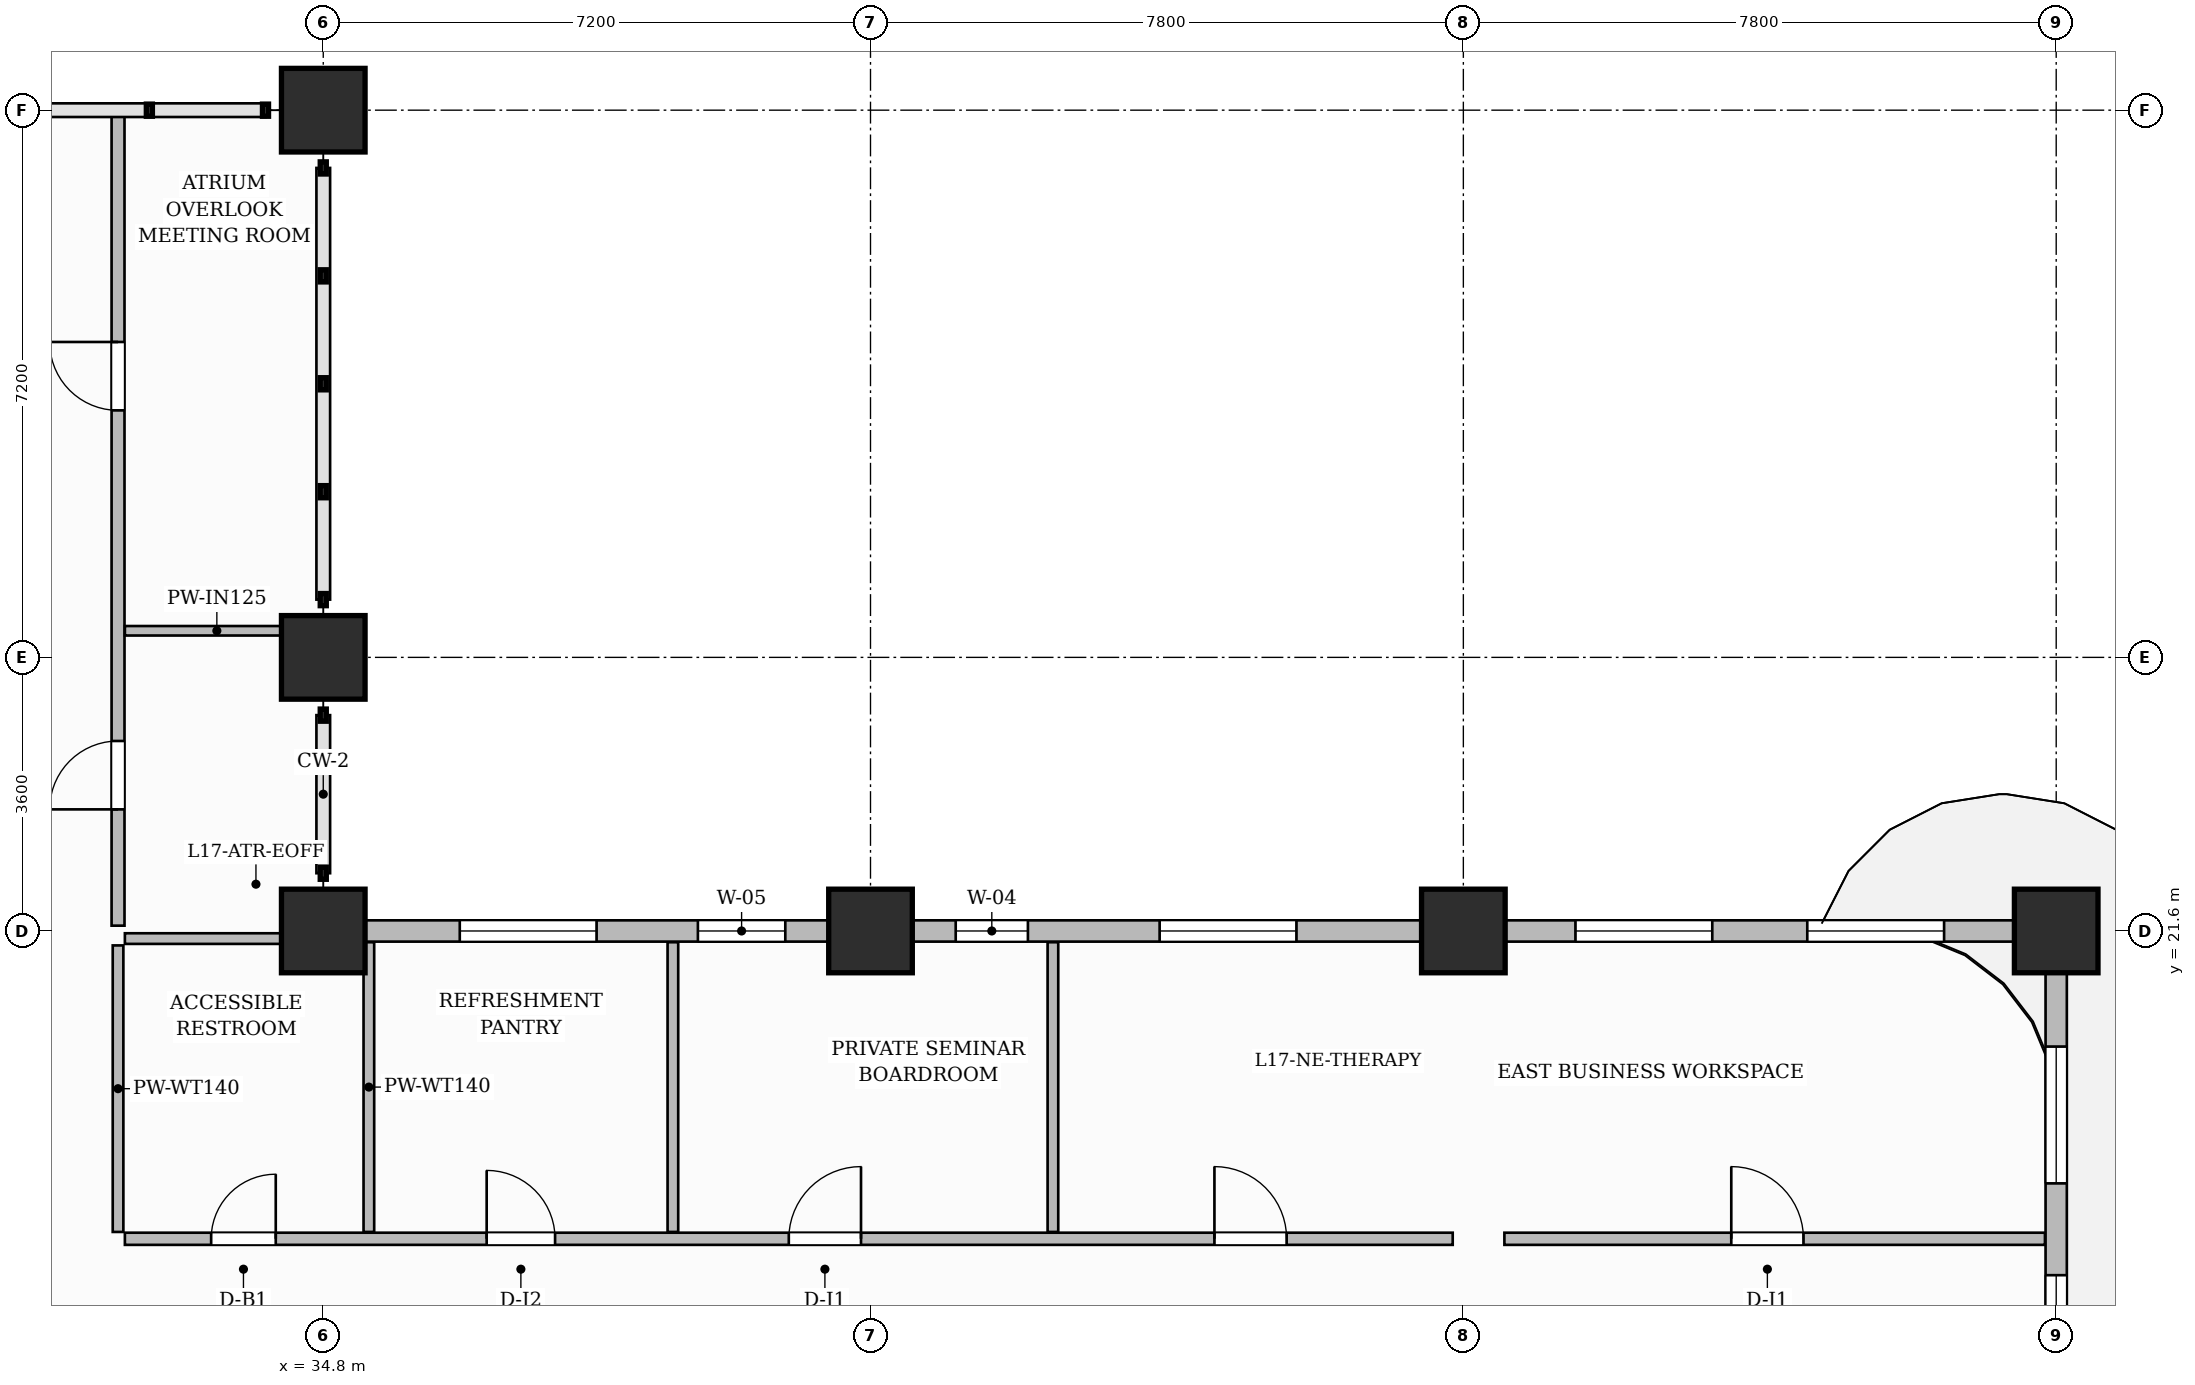
"""IFC4 building model, lengths in metres.
Left out: names, types, materials, properties, quantities, classifications, styles, units other than length and angle.
Written with IfcOpenShell. Run it as: python <this file> out.ifc"""

import sys

from ifc_helpers import new_model, si_unit, direction, frame, frame_2d, origin, origin_2d, place, context, subcontext, project, spatial, rectangle, extrude, source, transform, mapped, element, fill, save


model = new_model("IFC4")
c1 = context("Model", 3, precision=1e-05, world=origin(), true_north=direction((0.0, 1.0)))
c2 = subcontext(c1, "Body", "Model", "MODEL_VIEW")
j1 = project(units=[si_unit("LENGTHUNIT", "METRE"), si_unit("PLANEANGLEUNIT", "RADIAN")], contexts=[c1])
p1 = place(None, origin())
s1 = spatial("IfcSite", under=j1, at=p1, CompositionType="ELEMENT")
p2 = place(p1, origin())
s2 = spatial("IfcBuilding", under=s1, at=p2, CompositionType="ELEMENT")
p3 = place(p2, frame((0.0, 0.0, 73.1)))
s3 = spatial("IfcBuildingStorey", under=s2, at=p3, CompositionType="ELEMENT", Elevation=73.1)
m1 = source(origin(), c2, "Body", "SweptSolid", [
    extrude(rectangle(XDim=1.1, YDim=1.1, at=origin_2d()), origin(), (0.0, 0.0, 1.0), 3.7),
])
for number, where, z_axis, x_axis in (
    (1, (34.8, 21.6, 0.0), (0.0, 0.0, 1.0), (1.0, 0.0, 0.0)),
    (2, (34.8, 25.2, 0.0), (0.0, 0.0, 1.0), (1.0, 0.0, 0.0)),
    (3, (34.8, 32.4, 0.0), (0.0, 0.0, 1.0), (1.0, 0.0, 0.0)),
    (4, (42.0, 21.6, 0.0), (0.0, 0.0, 1.0), (1.0, 0.0, 0.0)),
    (5, (49.8, 21.6, 0.0), (0.0, 0.0, 1.0), (1.0, 0.0, 0.0)),
    (6, (57.6, 21.6, 0.0), (0.0, 0.0, 1.0), (1.0, 0.0, 0.0)),
):
    element("IfcColumn", number, at=place(p3, frame(where, z_axis=z_axis, x_axis=x_axis)), inside=s3, PredefinedType="COLUMN", context=c2, shape_type="MappedRepresentation", body=[
        mapped(m1, transform((0.0, 0.0, 0.0), scale=1.0)),
    ])
p4 = place(p3, frame((32.19, 17.55, 0.0), z_axis=(0.0, 0.0, 1.0), x_axis=(1.0, 0.0, 0.0)))
e7 = element("IfcWall", 7, at=p4, inside=s3, PredefinedType="PARTITIONING", context=c2, shape_type="SweptSolid", body=[
    extrude(rectangle(XDim=17.47, YDim=0.16, at=frame_2d((8.735, 0.0))), origin(), (0.0, 0.0, 1.0), 3.45),
])
p5 = place(p4, frame((1.135, 0.0, 0.0)))
e8 = element("IfcOpeningElement", 8, at=p5, cuts=e7, PredefinedType="OPENING", context=c2, shape_type="SweptSolid", body=[
    extrude(rectangle(XDim=0.85, YDim=2.1, at=frame_2d((0.425, 1.05))), frame((0.0, 0.09, 0.0), z_axis=(0.0, -1.0, 0.0), x_axis=(1.0, 0.0, 0.0)), (0.0, 0.0, 1.0), 0.18),
])
p6 = place(p4, frame((4.76, 0.0, 0.0)))
e9 = element("IfcOpeningElement", 9, at=p6, cuts=e7, PredefinedType="OPENING", context=c2, shape_type="SweptSolid", body=[
    extrude(rectangle(XDim=0.9, YDim=2.15, at=frame_2d((0.45, 1.075))), frame((0.0, 0.09, 0.0), z_axis=(0.0, -1.0, 0.0), x_axis=(1.0, 0.0, 0.0)), (0.0, 0.0, 1.0), 0.18),
])
p7 = place(p4, frame((8.735, 0.0, 0.0)))
e10 = element("IfcOpeningElement", 10, at=p7, cuts=e7, PredefinedType="OPENING", context=c2, shape_type="SweptSolid", body=[
    extrude(rectangle(XDim=0.95, YDim=2.15, at=frame_2d((0.475, 1.075))), frame((0.0, 0.09, 0.0), z_axis=(0.0, -1.0, 0.0), x_axis=(1.0, 0.0, 0.0)), (0.0, 0.0, 1.0), 0.18),
])
p8 = place(p4, frame((14.335, 0.0, 0.0)))
e11 = element("IfcOpeningElement", 11, at=p8, cuts=e7, PredefinedType="OPENING", context=c2, shape_type="SweptSolid", body=[
    extrude(rectangle(XDim=0.95, YDim=2.15, at=frame_2d((0.475, 1.075))), frame((0.0, 0.09, 0.0), z_axis=(0.0, -1.0, 0.0), x_axis=(1.0, 0.0, 0.0)), (0.0, 0.0, 1.0), 0.18),
])
p9 = place(p3, frame((50.34, 17.55, 0.0), z_axis=(0.0, 0.0, 1.0), x_axis=(1.0, 0.0, 0.0)))
e12 = element("IfcWall", 12, at=p9, inside=s3, PredefinedType="PARTITIONING", context=c2, shape_type="SweptSolid", body=[
    extrude(rectangle(XDim=7.112, YDim=0.16, at=frame_2d((3.556, 0.0))), origin(), (0.0, 0.0, 1.0), 3.45),
])
p10 = place(p9, frame((2.985, 0.0, 0.0)))
e13 = element("IfcOpeningElement", 13, at=p10, cuts=e12, PredefinedType="OPENING", context=c2, shape_type="SweptSolid", body=[
    extrude(rectangle(XDim=0.95, YDim=2.15, at=frame_2d((0.475, 1.075))), frame((0.0, 0.09, 0.0), z_axis=(0.0, -1.0, 0.0), x_axis=(1.0, 0.0, 0.0)), (0.0, 0.0, 1.0), 0.18),
])
p11 = place(p3, frame((32.1, 17.64, 0.0), z_axis=(0.0, 0.0, 1.0), x_axis=(0.0, 1.0, 0.0)))
e14 = element("IfcWall", 14, at=p11, inside=s3, PredefinedType="PARTITIONING", context=c2, shape_type="SweptSolid", body=[
    extrude(rectangle(XDim=3.77, YDim=0.14, at=frame_2d((1.885, 0.0))), origin(), (0.0, 0.0, 1.0), 3.45),
])
for number, where, z_axis, x_axis in (
    (15, (35.4, 17.64, 0.0), (0.0, 0.0, 1.0), (0.0, 1.0, 0.0)),
    (16, (39.4, 17.64, 0.0), (0.0, 0.0, 1.0), (0.0, 1.0, 0.0)),
    (17, (44.4, 17.64, 0.0), (0.0, 0.0, 1.0), (0.0, 1.0, 0.0)),
):
    element("IfcWall", number, at=place(p3, frame(where, z_axis=z_axis, x_axis=x_axis)), inside=s3, PredefinedType="PARTITIONING", context=c2, shape_type="SweptSolid", body=[
        extrude(rectangle(XDim=3.812, YDim=0.14, at=frame_2d((1.906, 0.0))), origin(), (0.0, 0.0, 1.0), 3.45),
    ])
p12 = place(p3, frame((32.19, 21.5, 0.0), z_axis=(0.0, 0.0, 1.0), x_axis=(1.0, 0.0, 0.0)))
e18 = element("IfcWall", 18, at=p12, inside=s3, PredefinedType="PARTITIONING", context=c2, shape_type="SweptSolid", body=[
    extrude(rectangle(XDim=2.42, YDim=0.14, at=frame_2d((1.21, 0.0))), origin(), (0.0, 0.0, 1.0), 2.885),
])
p13 = place(p3, frame((32.1, 21.67, 0.0), z_axis=(0.0, 0.0, 1.0), x_axis=(0.0, 1.0, 0.0)))
e19 = element("IfcWall", 19, at=p13, inside=s3, PredefinedType="PARTITIONING", context=c2, shape_type="SweptSolid", body=[
    extrude(rectangle(XDim=10.702, YDim=0.17, at=frame_2d((5.351, 0.0))), origin(), (0.0, 0.0, 1.0), 3.45),
])
p14 = place(p13, frame((1.53, 0.0, 0.0)))
e20 = element("IfcOpeningElement", 20, at=p14, cuts=e19, PredefinedType="OPENING", context=c2, shape_type="SweptSolid", body=[
    extrude(rectangle(XDim=0.9, YDim=2.15, at=frame_2d((0.45, 1.075))), frame((0.0, 0.095, 0.0), z_axis=(0.0, -1.0, 0.0), x_axis=(1.0, 0.0, 0.0)), (0.0, 0.0, 1.0), 0.19),
])
p15 = place(p13, frame((6.78, 0.0, 0.0)))
e21 = element("IfcOpeningElement", 21, at=p15, cuts=e19, PredefinedType="OPENING", context=c2, shape_type="SweptSolid", body=[
    extrude(rectangle(XDim=0.9, YDim=2.15, at=frame_2d((0.45, 1.075))), frame((0.0, 0.095, 0.0), z_axis=(0.0, -1.0, 0.0), x_axis=(1.0, 0.0, 0.0)), (0.0, 0.0, 1.0), 0.19),
])
p16 = place(p3, frame((32.19, 25.55, 0.0), z_axis=(0.0, 0.0, 1.0), x_axis=(1.0, 0.0, 0.0)))
e22 = element("IfcWall", 22, at=p16, inside=s3, PredefinedType="PARTITIONING", context=c2, shape_type="SweptSolid", body=[
    extrude(rectangle(XDim=2.42, YDim=0.125, at=frame_2d((1.21, 0.0))), origin(), (0.0, 0.0, 1.0), 3.45),
])
p17 = place(p3, frame((57.6, 0.05, 0.0), z_axis=(0.0, 0.0, 1.0), x_axis=(0.0, 1.0, 0.0)))
e23 = element("IfcWall", 23, at=p17, inside=s3, PredefinedType="SOLIDWALL", context=c2, shape_type="SweptSolid", body=[
    extrude(rectangle(XDim=21.5, YDim=0.28, at=frame_2d((10.75, 0.0))), origin(), (0.0, 0.0, 1.0), 2.885),
])
p18 = place(p17, frame((2.75, 0.0, 0.0)))
e24 = element("IfcOpeningElement", 24, at=p18, cuts=e23, PredefinedType="OPENING", context=c2, shape_type="SweptSolid", body=[
    extrude(rectangle(XDim=1.2, YDim=2.2, at=frame_2d((0.6, 1.1))), frame((0.0, 0.15, 0.0), z_axis=(0.0, -1.0, 0.0), x_axis=(1.0, 0.0, 0.0)), (0.0, 0.0, 1.0), 0.3),
])
p19 = place(p17, frame((1.025, 0.0, 0.8)))
e25 = element("IfcOpeningElement", 25, at=p19, cuts=e23, PredefinedType="OPENING", context=c2, shape_type="SweptSolid", body=[
    extrude(rectangle(XDim=1.15, YDim=1.8, at=frame_2d((0.575, 0.9))), frame((0.0, 0.15, 0.0), z_axis=(0.0, -1.0, 0.0), x_axis=(1.0, 0.0, 0.0)), (0.0, 0.0, 1.0), 0.3),
])
p20 = place(p17, frame((4.654, 0.0, 0.8)))
e26 = element("IfcOpeningElement", 26, at=p20, cuts=e23, PredefinedType="OPENING", context=c2, shape_type="SweptSolid", body=[
    extrude(rectangle(XDim=1.4, YDim=1.85, at=frame_2d((0.7, 0.925))), frame((0.0, 0.15, 0.0), z_axis=(0.0, -1.0, 0.0), x_axis=(1.0, 0.0, 0.0)), (0.0, 0.0, 1.0), 0.3),
])
p21 = place(p17, frame((10.454, 0.0, 0.8)))
e27 = element("IfcOpeningElement", 27, at=p21, cuts=e23, PredefinedType="OPENING", context=c2, shape_type="SweptSolid", body=[
    extrude(rectangle(XDim=1.8, YDim=1.85, at=frame_2d((0.9, 0.925))), frame((0.0, 0.15, 0.0), z_axis=(0.0, -1.0, 0.0), x_axis=(1.0, 0.0, 0.0)), (0.0, 0.0, 1.0), 0.3),
])
p22 = place(p17, frame((15.621, 0.0, 0.8)))
e28 = element("IfcOpeningElement", 28, at=p22, cuts=e23, PredefinedType="OPENING", context=c2, shape_type="SweptSolid", body=[
    extrude(rectangle(XDim=1.4, YDim=1.85, at=frame_2d((0.7, 0.925))), frame((0.0, 0.15, 0.0), z_axis=(0.0, -1.0, 0.0), x_axis=(1.0, 0.0, 0.0)), (0.0, 0.0, 1.0), 0.3),
])
p23 = place(p17, frame((18.229, 0.0, 0.8)))
e29 = element("IfcOpeningElement", 29, at=p23, cuts=e23, PredefinedType="OPENING", context=c2, shape_type="SweptSolid", body=[
    extrude(rectangle(XDim=1.8, YDim=1.85, at=frame_2d((0.9, 0.925))), frame((0.0, 0.15, 0.0), z_axis=(0.0, -1.0, 0.0), x_axis=(1.0, 0.0, 0.0)), (0.0, 0.0, 1.0), 0.3),
])
p24 = place(p3, frame((34.8, 21.6, 0.0), z_axis=(0.0, 0.0, 1.0), x_axis=(1.0, 0.0, 0.0)))
e30 = element("IfcWall", 30, at=p24, inside=s3, PredefinedType="SOLIDWALL", context=c2, shape_type="SweptSolid", body=[
    extrude(rectangle(XDim=22.8, YDim=0.28, at=frame_2d((11.4, 0.0))), origin(), (0.0, 0.0, 1.0), 2.885),
])
p25 = place(p24, frame((1.796, 0.0, 0.8)))
e31 = element("IfcOpeningElement", 31, at=p25, cuts=e30, PredefinedType="OPENING", context=c2, shape_type="SweptSolid", body=[
    extrude(rectangle(XDim=1.8, YDim=1.85, at=frame_2d((0.9, 0.925))), frame((0.0, 0.15, 0.0), z_axis=(0.0, -1.0, 0.0), x_axis=(1.0, 0.0, 0.0)), (0.0, 0.0, 1.0), 0.3),
])
p26 = place(p24, frame((4.929, 0.0, 0.8)))
e32 = element("IfcOpeningElement", 32, at=p26, cuts=e30, PredefinedType="OPENING", context=c2, shape_type="SweptSolid", body=[
    extrude(rectangle(XDim=1.15, YDim=1.8, at=frame_2d((0.575, 0.9))), frame((0.0, 0.15, 0.0), z_axis=(0.0, -1.0, 0.0), x_axis=(1.0, 0.0, 0.0)), (0.0, 0.0, 1.0), 0.3),
])
p27 = place(p24, frame((8.321, 0.0, 0.8)))
e33 = element("IfcOpeningElement", 33, at=p27, cuts=e30, PredefinedType="OPENING", context=c2, shape_type="SweptSolid", body=[
    extrude(rectangle(XDim=0.95, YDim=1.75, at=frame_2d((0.475, 0.875))), frame((0.0, 0.15, 0.0), z_axis=(0.0, -1.0, 0.0), x_axis=(1.0, 0.0, 0.0)), (0.0, 0.0, 1.0), 0.3),
])
p28 = place(p24, frame((11.004, 0.0, 0.8)))
e34 = element("IfcOpeningElement", 34, at=p28, cuts=e30, PredefinedType="OPENING", context=c2, shape_type="SweptSolid", body=[
    extrude(rectangle(XDim=1.8, YDim=1.85, at=frame_2d((0.9, 0.925))), frame((0.0, 0.15, 0.0), z_axis=(0.0, -1.0, 0.0), x_axis=(1.0, 0.0, 0.0)), (0.0, 0.0, 1.0), 0.3),
])
p29 = place(p24, frame((16.475, 0.0, 0.8)))
e35 = element("IfcOpeningElement", 35, at=p29, cuts=e30, PredefinedType="OPENING", context=c2, shape_type="SweptSolid", body=[
    extrude(rectangle(XDim=1.8, YDim=1.85, at=frame_2d((0.9, 0.925))), frame((0.0, 0.15, 0.0), z_axis=(0.0, -1.0, 0.0), x_axis=(1.0, 0.0, 0.0)), (0.0, 0.0, 1.0), 0.3),
])
p30 = place(p24, frame((19.525, 0.0, 0.8)))
e36 = element("IfcOpeningElement", 36, at=p30, cuts=e30, PredefinedType="OPENING", context=c2, shape_type="SweptSolid", body=[
    extrude(rectangle(XDim=1.8, YDim=1.85, at=frame_2d((0.9, 0.925))), frame((0.0, 0.15, 0.0), z_axis=(0.0, -1.0, 0.0), x_axis=(1.0, 0.0, 0.0)), (0.0, 0.0, 1.0), 0.3),
])
m2 = source(origin(), c2, "Body", "SweptSolid", [
    extrude(rectangle(XDim=0.95, YDim=2.15, at=frame_2d((0.475, 1.075))), frame((0.0, 0.025, 0.0), z_axis=(0.0, -1.0, 0.0), x_axis=(1.0, 0.0, 0.0)), (0.0, 0.0, 1.0), 0.05),
])
p31 = place(p10, origin())
e37 = element("IfcDoor", 37, at=p31, inside=s3, OperationType="SINGLE_SWING_LEFT", PredefinedType="DOOR", context=c2, shape_type="MappedRepresentation", body=[
    mapped(m2, transform((0.0, 0.0, 0.0), scale=1.0)),
])
fill(e13, e37)
m3 = source(origin(), c2, "Body", "SweptSolid", [
    extrude(rectangle(XDim=0.85, YDim=2.1, at=frame_2d((0.425, 1.05))), frame((0.0, 0.025, 0.0), z_axis=(0.0, -1.0, 0.0), x_axis=(1.0, 0.0, 0.0)), (0.0, 0.0, 1.0), 0.05),
])
p32 = place(p5, origin())
e38 = element("IfcDoor", 38, at=p32, inside=s3, OperationType="SINGLE_SWING_RIGHT", PredefinedType="DOOR", context=c2, shape_type="MappedRepresentation", body=[
    mapped(m3, transform((0.0, 0.0, 0.0), scale=1.0)),
])
fill(e8, e38)
m4 = source(origin(), c2, "Body", "SweptSolid", [
    extrude(rectangle(XDim=0.9, YDim=2.15, at=frame_2d((0.45, 1.075))), frame((0.0, 0.025, 0.0), z_axis=(0.0, -1.0, 0.0), x_axis=(1.0, 0.0, 0.0)), (0.0, 0.0, 1.0), 0.05),
])
p33 = place(p6, origin())
e39 = element("IfcDoor", 39, at=p33, inside=s3, OperationType="SINGLE_SWING_LEFT", PredefinedType="DOOR", context=c2, shape_type="MappedRepresentation", body=[
    mapped(m4, transform((0.0, 0.0, 0.0), scale=1.0)),
])
fill(e9, e39)
p34 = place(p7, origin())
e40 = element("IfcDoor", 40, at=p34, inside=s3, OperationType="SINGLE_SWING_RIGHT", PredefinedType="DOOR", context=c2, shape_type="MappedRepresentation", body=[
    mapped(m2, transform((0.0, 0.0, 0.0), scale=1.0)),
])
fill(e10, e40)
p35 = place(p8, origin())
e41 = element("IfcDoor", 41, at=p35, inside=s3, OperationType="SINGLE_SWING_LEFT", PredefinedType="DOOR", context=c2, shape_type="MappedRepresentation", body=[
    mapped(m2, transform((0.0, 0.0, 0.0), scale=1.0)),
])
fill(e11, e41)
p36 = place(p14, origin())
e42 = element("IfcDoor", 42, at=p36, inside=s3, OperationType="SINGLE_SWING_LEFT", PredefinedType="DOOR", context=c2, shape_type="MappedRepresentation", body=[
    mapped(m4, transform((0.0, 0.0, 0.0), scale=1.0)),
])
fill(e20, e42)
p37 = place(p15, origin())
e43 = element("IfcDoor", 43, at=p37, inside=s3, OperationType="SINGLE_SWING_RIGHT", PredefinedType="DOOR", context=c2, shape_type="MappedRepresentation", body=[
    mapped(m4, transform((0.0, 0.0, 0.0), scale=1.0)),
])
fill(e21, e43)
m5 = source(origin(), c2, "Body", "SweptSolid", [
    extrude(rectangle(XDim=1.4, YDim=1.85, at=frame_2d((0.7, 0.925))), frame((0.0, 0.03, 0.0), z_axis=(0.0, -1.0, 0.0), x_axis=(1.0, 0.0, 0.0)), (0.0, 0.0, 1.0), 0.06),
])
p38 = place(p22, origin())
e44 = element("IfcWindow", 44, at=p38, inside=s3, PartitioningType="SINGLE_PANEL", PredefinedType="WINDOW", context=c2, shape_type="MappedRepresentation", body=[
    mapped(m5, transform((0.0, 0.0, 0.0), scale=1.0)),
])
fill(e28, e44)
m6 = source(origin(), c2, "Body", "SweptSolid", [
    extrude(rectangle(XDim=1.8, YDim=1.85, at=frame_2d((0.9, 0.925))), frame((0.0, 0.03, 0.0), z_axis=(0.0, -1.0, 0.0), x_axis=(1.0, 0.0, 0.0)), (0.0, 0.0, 1.0), 0.06),
])
p39 = place(p23, origin())
e45 = element("IfcWindow", 45, at=p39, inside=s3, PartitioningType="DOUBLE_PANEL_VERTICAL", PredefinedType="WINDOW", context=c2, shape_type="MappedRepresentation", body=[
    mapped(m6, transform((0.0, 0.0, 0.0), scale=1.0)),
])
fill(e29, e45)
p40 = place(p25, origin())
e46 = element("IfcWindow", 46, at=p40, inside=s3, PartitioningType="DOUBLE_PANEL_VERTICAL", PredefinedType="WINDOW", context=c2, shape_type="MappedRepresentation", body=[
    mapped(m6, transform((0.0, 0.0, 0.0), scale=1.0)),
])
fill(e31, e46)
m7 = source(origin(), c2, "Body", "SweptSolid", [
    extrude(rectangle(XDim=1.15, YDim=1.8, at=frame_2d((0.575, 0.9))), frame((0.0, 0.03, 0.0), z_axis=(0.0, -1.0, 0.0), x_axis=(1.0, 0.0, 0.0)), (0.0, 0.0, 1.0), 0.06),
])
p41 = place(p26, origin())
e47 = element("IfcWindow", 47, at=p41, inside=s3, PartitioningType="SINGLE_PANEL", PredefinedType="WINDOW", context=c2, shape_type="MappedRepresentation", body=[
    mapped(m7, transform((0.0, 0.0, 0.0), scale=1.0)),
])
fill(e32, e47)
m8 = source(origin(), c2, "Body", "SweptSolid", [
    extrude(rectangle(XDim=0.95, YDim=1.75, at=frame_2d((0.475, 0.875))), frame((0.0, 0.03, 0.0), z_axis=(0.0, -1.0, 0.0), x_axis=(1.0, 0.0, 0.0)), (0.0, 0.0, 1.0), 0.06),
])
p42 = place(p27, origin())
e48 = element("IfcWindow", 48, at=p42, inside=s3, PartitioningType="SINGLE_PANEL", PredefinedType="WINDOW", context=c2, shape_type="MappedRepresentation", body=[
    mapped(m8, transform((0.0, 0.0, 0.0), scale=1.0)),
])
fill(e33, e48)
p43 = place(p28, origin())
e49 = element("IfcWindow", 49, at=p43, inside=s3, PartitioningType="DOUBLE_PANEL_VERTICAL", PredefinedType="WINDOW", context=c2, shape_type="MappedRepresentation", body=[
    mapped(m6, transform((0.0, 0.0, 0.0), scale=1.0)),
])
fill(e34, e49)
p44 = place(p29, origin())
e50 = element("IfcWindow", 50, at=p44, inside=s3, PartitioningType="DOUBLE_PANEL_VERTICAL", PredefinedType="WINDOW", context=c2, shape_type="MappedRepresentation", body=[
    mapped(m6, transform((0.0, 0.0, 0.0), scale=1.0)),
])
fill(e35, e50)
p45 = place(p30, origin())
e51 = element("IfcWindow", 51, at=p45, inside=s3, PartitioningType="DOUBLE_PANEL_VERTICAL", PredefinedType="WINDOW", context=c2, shape_type="MappedRepresentation", body=[
    mapped(m6, transform((0.0, 0.0, 0.0), scale=1.0)),
])
fill(e36, e51)
save(model, sys.argv[1])
